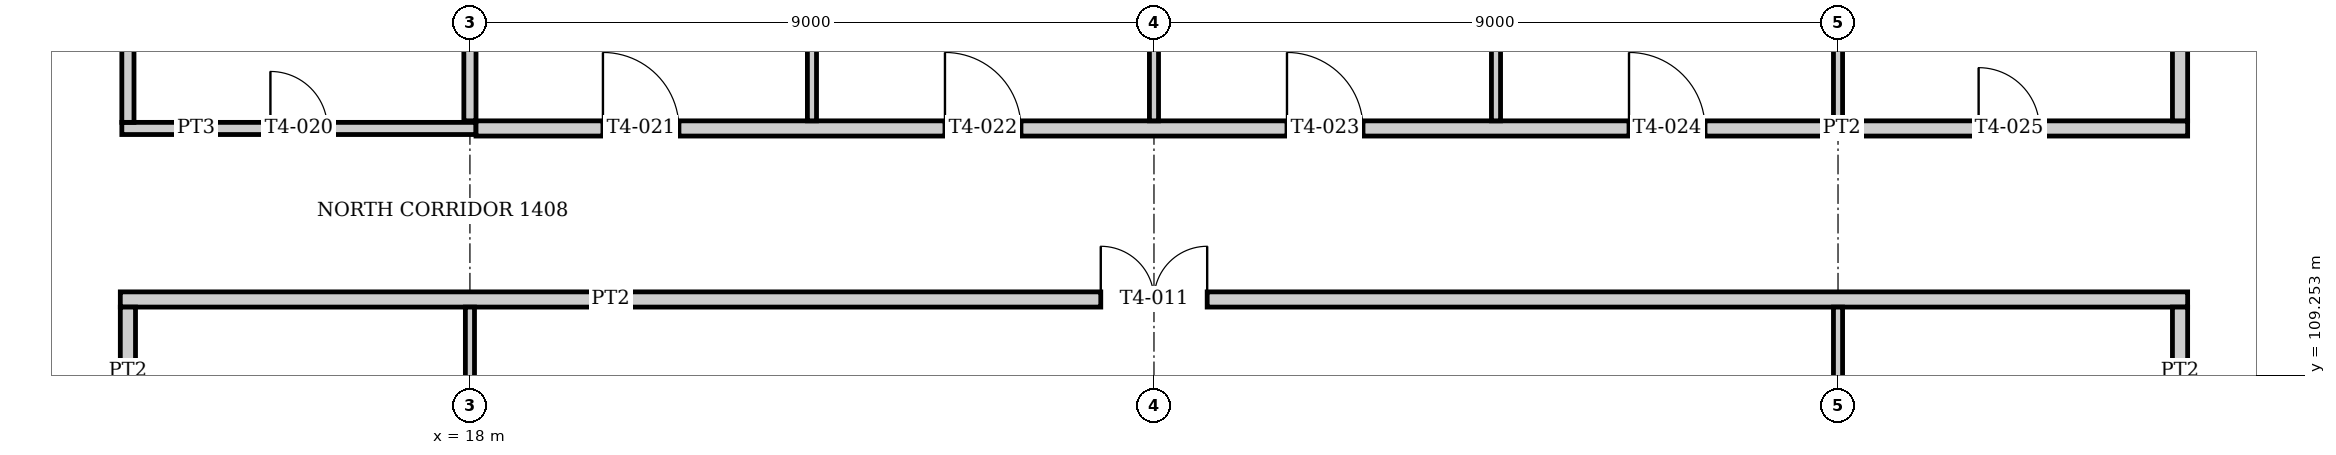
"""IFC4 building model, lengths in metres.
Left out: names, types, materials, properties, quantities, classifications, styles, units other than length and angle.
Written with IfcOpenShell. Run it as: python <this file> out.ifc"""

import sys

from ifc_helpers import new_model, si_unit, direction, frame, frame_2d, origin, place, context, subcontext, project, spatial, rectangle, extrude, element, fill, save


model = new_model("IFC4")
c1 = context("Model", 3, precision=1e-05, world=origin(), true_north=direction((0.0, 1.0)))
c2 = subcontext(c1, "Body", "Model", "MODEL_VIEW")
j1 = project(units=[si_unit("LENGTHUNIT", "METRE"), si_unit("PLANEANGLEUNIT", "RADIAN")], contexts=[c1])
p1 = place(None, origin())
s1 = spatial("IfcSite", under=j1, at=p1, CompositionType="ELEMENT")
p2 = place(p1, origin())
s2 = spatial("IfcBuilding", under=s1, at=p2, CompositionType="ELEMENT")
p3 = place(p2, frame((0.0, 0.0, 59.2)))
s3 = spatial("IfcBuildingStorey", under=s2, at=p3, CompositionType="ELEMENT", Elevation=59.2)
p4 = place(p3, frame((13.4, 110.25, 0.0), z_axis=(0.0, 0.0, 1.0), x_axis=(1.0, 0.0, 0.0)))
e1 = element("IfcWall", 1, at=p4, inside=s3, PredefinedType="PARTITIONING", context=c2, shape_type="SweptSolid", body=[
    extrude(rectangle(XDim=27.2, YDim=0.2, at=frame_2d((13.6, 0.0))), origin(), (0.0, 0.0, 1.0), 3.05),
])
p5 = place(p4, frame((12.9, 0.0, 0.0)))
e2 = element("IfcOpeningElement", 2, at=p5, cuts=e1, PredefinedType="OPENING", context=c2, shape_type="SweptSolid", body=[
    extrude(rectangle(XDim=1.4, YDim=2.1, at=frame_2d((0.7, 1.05))), frame((0.0, 0.11, 0.0), z_axis=(0.0, -1.0, 0.0), x_axis=(1.0, 0.0, 0.0)), (0.0, 0.0, 1.0), 0.22),
])
p6 = place(p3, frame((13.42, 112.5, 0.0), z_axis=(0.0, 0.0, 1.0), x_axis=(1.0, 0.0, 0.0)))
e3 = element("IfcWall", 3, at=p6, inside=s3, PredefinedType="PARTITIONING", context=c2, shape_type="SweptSolid", body=[
    extrude(rectangle(XDim=4.66, YDim=0.16, at=frame_2d((2.33, 0.0))), origin(), (0.0, 0.0, 1.0), 3.05),
])
p7 = place(p6, frame((1.955, 0.0, 0.0)))
e4 = element("IfcOpeningElement", 4, at=p7, cuts=e3, PredefinedType="OPENING", context=c2, shape_type="SweptSolid", body=[
    extrude(rectangle(XDim=0.75, YDim=2.1, at=frame_2d((0.375, 1.05))), frame((0.0, 0.09, 0.0), z_axis=(0.0, -1.0, 0.0), x_axis=(1.0, 0.0, 0.0)), (0.0, 0.0, 1.0), 0.18),
])
p8 = place(p3, frame((18.08, 112.5, 0.0), z_axis=(0.0, 0.0, 1.0), x_axis=(1.0, 0.0, 0.0)))
e5 = element("IfcWall", 5, at=p8, inside=s3, PredefinedType="PARTITIONING", context=c2, shape_type="SweptSolid", body=[
    extrude(rectangle(XDim=22.52, YDim=0.2, at=frame_2d((11.26, 0.0))), origin(), (0.0, 0.0, 1.0), 3.05),
])
p9 = place(p8, frame((1.67, 0.0, 0.0)))
e6 = element("IfcOpeningElement", 6, at=p9, cuts=e5, PredefinedType="OPENING", context=c2, shape_type="SweptSolid", body=[
    extrude(rectangle(XDim=1.0, YDim=2.1, at=frame_2d((0.5, 1.05))), frame((0.0, 0.11, 0.0), z_axis=(0.0, -1.0, 0.0), x_axis=(1.0, 0.0, 0.0)), (0.0, 0.0, 1.0), 0.22),
])
p10 = place(p8, frame((6.17, 0.0, 0.0)))
e7 = element("IfcOpeningElement", 7, at=p10, cuts=e5, PredefinedType="OPENING", context=c2, shape_type="SweptSolid", body=[
    extrude(rectangle(XDim=1.0, YDim=2.1, at=frame_2d((0.5, 1.05))), frame((0.0, 0.11, 0.0), z_axis=(0.0, -1.0, 0.0), x_axis=(1.0, 0.0, 0.0)), (0.0, 0.0, 1.0), 0.22),
])
p11 = place(p8, frame((10.67, 0.0, 0.0)))
e8 = element("IfcOpeningElement", 8, at=p11, cuts=e5, PredefinedType="OPENING", context=c2, shape_type="SweptSolid", body=[
    extrude(rectangle(XDim=1.0, YDim=2.1, at=frame_2d((0.5, 1.05))), frame((0.0, 0.11, 0.0), z_axis=(0.0, -1.0, 0.0), x_axis=(1.0, 0.0, 0.0)), (0.0, 0.0, 1.0), 0.22),
])
p12 = place(p8, frame((15.17, 0.0, 0.0)))
e9 = element("IfcOpeningElement", 9, at=p12, cuts=e5, PredefinedType="OPENING", context=c2, shape_type="SweptSolid", body=[
    extrude(rectangle(XDim=1.0, YDim=2.1, at=frame_2d((0.5, 1.05))), frame((0.0, 0.11, 0.0), z_axis=(0.0, -1.0, 0.0), x_axis=(1.0, 0.0, 0.0)), (0.0, 0.0, 1.0), 0.22),
])
p13 = place(p8, frame((19.77, 0.0, 0.0)))
e10 = element("IfcOpeningElement", 10, at=p13, cuts=e5, PredefinedType="OPENING", context=c2, shape_type="SweptSolid", body=[
    extrude(rectangle(XDim=0.8, YDim=2.1, at=frame_2d((0.4, 1.05))), frame((0.0, 0.11, 0.0), z_axis=(0.0, -1.0, 0.0), x_axis=(1.0, 0.0, 0.0)), (0.0, 0.0, 1.0), 0.22),
])
p14 = place(p3, frame((13.5, 105.85, 0.0), z_axis=(0.0, 0.0, 1.0), x_axis=(0.0, 1.0, 0.0)))
e11 = element("IfcWall", 11, at=p14, inside=s3, PredefinedType="PARTITIONING", context=c2, shape_type="SweptSolid", body=[
    extrude(rectangle(XDim=4.3, YDim=0.2, at=frame_2d((2.15, 0.0))), origin(), (0.0, 0.0, 1.0), 3.05),
])
p15 = place(p14, frame((1.69, 0.0, 0.0)))
e12 = element("IfcOpeningElement", 12, at=p15, cuts=e11, PredefinedType="OPENING", context=c2, shape_type="SweptSolid", body=[
    extrude(rectangle(XDim=0.92, YDim=2.1, at=frame_2d((0.46, 1.05))), frame((0.0, 0.11, 0.0), z_axis=(0.0, -1.0, 0.0), x_axis=(1.0, 0.0, 0.0)), (0.0, 0.0, 1.0), 0.22),
])
p16 = place(p3, frame((13.5, 112.58, 0.0), z_axis=(0.0, 0.0, 1.0), x_axis=(0.0, 1.0, 0.0)))
e13 = element("IfcWall", 13, at=p16, inside=s3, PredefinedType="PARTITIONING", context=c2, shape_type="SweptSolid", body=[
    extrude(rectangle(XDim=4.33, YDim=0.16, at=frame_2d((2.165, 0.0))), origin(), (0.0, 0.0, 1.0), 3.05),
])
p17 = place(p3, frame((18.0, 105.85, 0.0), z_axis=(0.0, 0.0, 1.0), x_axis=(0.0, 1.0, 0.0)))
e14 = element("IfcWall", 14, at=p17, inside=s3, PredefinedType="PARTITIONING", context=c2, shape_type="SweptSolid", body=[
    extrude(rectangle(XDim=4.3, YDim=0.12, at=frame_2d((2.15, 0.0))), origin(), (0.0, 0.0, 1.0), 3.05),
])
p18 = place(p3, frame((18.0, 112.6, 0.0), z_axis=(0.0, 0.0, 1.0), x_axis=(0.0, 1.0, 0.0)))
e15 = element("IfcWall", 15, at=p18, inside=s3, PredefinedType="PARTITIONING", context=c2, shape_type="SweptSolid", body=[
    extrude(rectangle(XDim=4.555, YDim=0.16, at=frame_2d((2.278, 0.0))), origin(), (0.0, 0.0, 1.0), 3.05),
])
p19 = place(p3, frame((22.5, 112.6, 0.0), z_axis=(0.0, 0.0, 1.0), x_axis=(0.0, 1.0, 0.0)))
e16 = element("IfcWall", 16, at=p19, inside=s3, PredefinedType="PARTITIONING", context=c2, shape_type="SweptSolid", body=[
    extrude(rectangle(XDim=4.4, YDim=0.12, at=frame_2d((2.2, 0.0))), origin(), (0.0, 0.0, 1.0), 3.05),
])
p20 = place(p3, frame((27.0, 112.6, 0.0), z_axis=(0.0, 0.0, 1.0), x_axis=(0.0, 1.0, 0.0)))
e17 = element("IfcWall", 17, at=p20, inside=s3, PredefinedType="PARTITIONING", context=c2, shape_type="SweptSolid", body=[
    extrude(rectangle(XDim=4.236, YDim=0.12, at=frame_2d((2.118, 0.0))), origin(), (0.0, 0.0, 1.0), 3.05),
])
p21 = place(p3, frame((31.5, 112.6, 0.0), z_axis=(0.0, 0.0, 1.0), x_axis=(0.0, 1.0, 0.0)))
e18 = element("IfcWall", 18, at=p21, inside=s3, PredefinedType="PARTITIONING", context=c2, shape_type="SweptSolid", body=[
    extrude(rectangle(XDim=4.4, YDim=0.12, at=frame_2d((2.2, 0.0))), origin(), (0.0, 0.0, 1.0), 3.05),
])
p22 = place(p3, frame((36.0, 105.85, 0.0), z_axis=(0.0, 0.0, 1.0), x_axis=(0.0, 1.0, 0.0)))
e19 = element("IfcWall", 19, at=p22, inside=s3, PredefinedType="PARTITIONING", context=c2, shape_type="SweptSolid", body=[
    extrude(rectangle(XDim=4.3, YDim=0.12, at=frame_2d((2.15, 0.0))), origin(), (0.0, 0.0, 1.0), 3.05),
])
p23 = place(p3, frame((36.0, 112.6, 0.0), z_axis=(0.0, 0.0, 1.0), x_axis=(0.0, 1.0, 0.0)))
e20 = element("IfcWall", 20, at=p23, inside=s3, PredefinedType="PARTITIONING", context=c2, shape_type="SweptSolid", body=[
    extrude(rectangle(XDim=4.555, YDim=0.12, at=frame_2d((2.278, 0.0))), origin(), (0.0, 0.0, 1.0), 3.05),
])
p24 = place(p3, frame((40.5, 105.85, 0.0), z_axis=(0.0, 0.0, 1.0), x_axis=(0.0, 1.0, 0.0)))
e21 = element("IfcWall", 21, at=p24, inside=s3, PredefinedType="PARTITIONING", context=c2, shape_type="SweptSolid", body=[
    extrude(rectangle(XDim=4.3, YDim=0.2, at=frame_2d((2.15, 0.0))), origin(), (0.0, 0.0, 1.0), 3.05),
])
p25 = place(p24, frame((1.69, 0.0, 0.0)))
e22 = element("IfcOpeningElement", 22, at=p25, cuts=e21, PredefinedType="OPENING", context=c2, shape_type="SweptSolid", body=[
    extrude(rectangle(XDim=0.92, YDim=2.1, at=frame_2d((0.46, 1.05))), frame((0.0, 0.11, 0.0), z_axis=(0.0, -1.0, 0.0), x_axis=(1.0, 0.0, 0.0)), (0.0, 0.0, 1.0), 0.22),
])
p26 = place(p3, frame((40.5, 112.6, 0.0), z_axis=(0.0, 0.0, 1.0), x_axis=(0.0, 1.0, 0.0)))
e23 = element("IfcWall", 23, at=p26, inside=s3, PredefinedType="PARTITIONING", context=c2, shape_type="SweptSolid", body=[
    extrude(rectangle(XDim=4.31, YDim=0.2, at=frame_2d((2.155, 0.0))), origin(), (0.0, 0.0, 1.0), 3.05),
])
p27 = place(p5, origin())
e24 = element("IfcDoor", 24, at=p27, inside=s3, OperationType="DOUBLE_DOOR_SINGLE_SWING", PredefinedType="DOOR", context=c2, shape_type="SweptSolid", body=[
    extrude(rectangle(XDim=1.4, YDim=2.1, at=frame_2d((0.7, 1.05))), frame((0.0, 0.025, 0.0), z_axis=(0.0, -1.0, 0.0), x_axis=(1.0, 0.0, 0.0)), (0.0, 0.0, 1.0), 0.05),
])
fill(e2, e24)
p28 = place(p7, origin())
e25 = element("IfcDoor", 25, at=p28, inside=s3, OperationType="SINGLE_SWING_LEFT", PredefinedType="DOOR", context=c2, shape_type="SweptSolid", body=[
    extrude(rectangle(XDim=0.75, YDim=2.1, at=frame_2d((0.375, 1.05))), frame((0.0, 0.025, 0.0), z_axis=(0.0, -1.0, 0.0), x_axis=(1.0, 0.0, 0.0)), (0.0, 0.0, 1.0), 0.05),
])
fill(e4, e25)
p29 = place(p9, origin())
e26 = element("IfcDoor", 26, at=p29, inside=s3, OperationType="SINGLE_SWING_LEFT", PredefinedType="DOOR", context=c2, shape_type="SweptSolid", body=[
    extrude(rectangle(XDim=1.0, YDim=2.1, at=frame_2d((0.5, 1.05))), frame((0.0, 0.025, 0.0), z_axis=(0.0, -1.0, 0.0), x_axis=(1.0, 0.0, 0.0)), (0.0, 0.0, 1.0), 0.05),
])
fill(e6, e26)
p30 = place(p10, origin())
e27 = element("IfcDoor", 27, at=p30, inside=s3, OperationType="SINGLE_SWING_LEFT", PredefinedType="DOOR", context=c2, shape_type="SweptSolid", body=[
    extrude(rectangle(XDim=1.0, YDim=2.1, at=frame_2d((0.5, 1.05))), frame((0.0, 0.025, 0.0), z_axis=(0.0, -1.0, 0.0), x_axis=(1.0, 0.0, 0.0)), (0.0, 0.0, 1.0), 0.05),
])
fill(e7, e27)
p31 = place(p11, origin())
e28 = element("IfcDoor", 28, at=p31, inside=s3, OperationType="SINGLE_SWING_LEFT", PredefinedType="DOOR", context=c2, shape_type="SweptSolid", body=[
    extrude(rectangle(XDim=1.0, YDim=2.1, at=frame_2d((0.5, 1.05))), frame((0.0, 0.025, 0.0), z_axis=(0.0, -1.0, 0.0), x_axis=(1.0, 0.0, 0.0)), (0.0, 0.0, 1.0), 0.05),
])
fill(e8, e28)
p32 = place(p12, origin())
e29 = element("IfcDoor", 29, at=p32, inside=s3, OperationType="SINGLE_SWING_LEFT", PredefinedType="DOOR", context=c2, shape_type="SweptSolid", body=[
    extrude(rectangle(XDim=1.0, YDim=2.1, at=frame_2d((0.5, 1.05))), frame((0.0, 0.025, 0.0), z_axis=(0.0, -1.0, 0.0), x_axis=(1.0, 0.0, 0.0)), (0.0, 0.0, 1.0), 0.05),
])
fill(e9, e29)
p33 = place(p13, origin())
e30 = element("IfcDoor", 30, at=p33, inside=s3, OperationType="SINGLE_SWING_LEFT", PredefinedType="DOOR", context=c2, shape_type="SweptSolid", body=[
    extrude(rectangle(XDim=0.8, YDim=2.1, at=frame_2d((0.4, 1.05))), frame((0.0, 0.025, 0.0), z_axis=(0.0, -1.0, 0.0), x_axis=(1.0, 0.0, 0.0)), (0.0, 0.0, 1.0), 0.05),
])
fill(e10, e30)
save(model, sys.argv[1])
